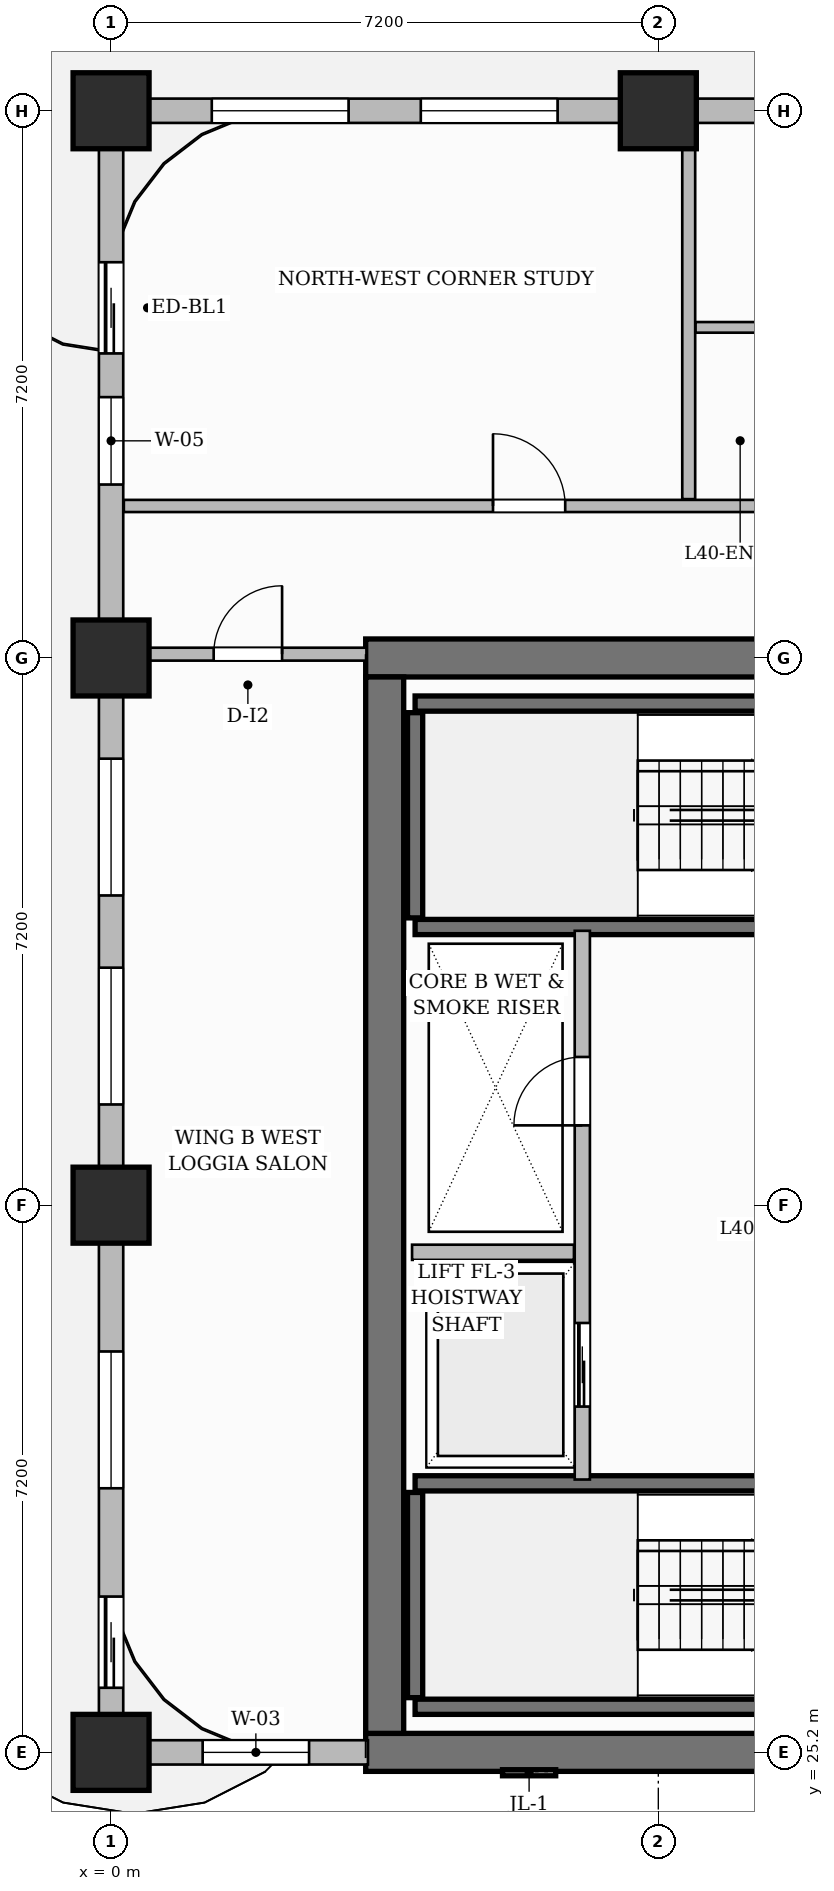
"""IFC4 building model, lengths in metres.
Left out: names, types, materials, properties, quantities, classifications, styles, units other than length and angle.
Written with IfcOpenShell. Run it as: python <this file> out.ifc"""

import sys

from ifc_helpers import new_model, si_unit, direction, frame, frame_2d, origin, origin_2d, place, context, subcontext, project, spatial, rectangle, extrude, source, transform, mapped, element, fill, save


model = new_model("IFC4")
c1 = context("Model", 3, precision=1e-05, world=origin(), true_north=direction((0.0, 1.0)))
c2 = subcontext(c1, "Body", "Model", "MODEL_VIEW")
j1 = project(units=[si_unit("LENGTHUNIT", "METRE"), si_unit("PLANEANGLEUNIT", "RADIAN")], contexts=[c1])
p1 = place(None, origin())
s1 = spatial("IfcSite", under=j1, at=p1, CompositionType="ELEMENT")
p2 = place(p1, origin())
s2 = spatial("IfcBuilding", under=s1, at=p2, CompositionType="ELEMENT")
p3 = place(p2, frame((0.0, 0.0, 161.85)))
s3 = spatial("IfcBuildingStorey", under=s2, at=p3, CompositionType="ELEMENT", Elevation=161.85)
for number, where, z_axis, x_axis in (
    (1, (3.35, 25.2, 0.0), (0.0, 0.0, 1.0), (1.0, 0.0, 0.0)),
    (2, (3.35, 39.6, 0.0), (0.0, 0.0, 1.0), (1.0, 0.0, 0.0)),
):
    element("IfcWall", number, at=place(p3, frame(where, z_axis=z_axis, x_axis=x_axis)), inside=s3, PredefinedType="SHEAR", context=c2, shape_type="SweptSolid", body=[
        extrude(rectangle(XDim=8.3, YDim=0.5, at=frame_2d((4.15, 0.0))), origin(), (0.0, 0.0, 1.0), 3.85),
    ])
p4 = place(p3, frame((3.6, 25.45, 0.0), z_axis=(0.0, 0.0, 1.0), x_axis=(0.0, 1.0, 0.0)))
e3 = element("IfcWall", 3, at=p4, inside=s3, PredefinedType="SHEAR", context=c2, shape_type="SweptSolid", body=[
    extrude(rectangle(XDim=13.9, YDim=0.5, at=frame_2d((6.95, 0.0))), origin(), (0.0, 0.0, 1.0), 3.85),
])
m1 = source(origin(), c2, "Body", "SweptSolid", [
    extrude(rectangle(XDim=1.0, YDim=1.0, at=origin_2d()), origin(), (0.0, 0.0, 1.0), 3.85),
])
for number, where, z_axis, x_axis in (
    (4, (0.0, 25.2, 0.0), (0.0, 0.0, 1.0), (1.0, 0.0, 0.0)),
    (5, (0.0, 32.4, 0.0), (0.0, 0.0, 1.0), (1.0, 0.0, 0.0)),
    (6, (0.0, 39.6, 0.0), (0.0, 0.0, 1.0), (1.0, 0.0, 0.0)),
    (7, (0.0, 46.8, 0.0), (0.0, 0.0, 1.0), (1.0, 0.0, 0.0)),
    (8, (7.2, 46.8, 0.0), (0.0, 0.0, 1.0), (1.0, 0.0, 0.0)),
):
    element("IfcColumn", number, at=place(p3, frame(where, z_axis=z_axis, x_axis=x_axis)), inside=s3, PredefinedType="COLUMN", context=c2, shape_type="MappedRepresentation", body=[
        mapped(m1, transform((0.0, 0.0, 0.0), scale=1.0)),
    ])
p5 = place(p3, frame((4.0, 25.8, 0.0), z_axis=(0.0, 0.0, 1.0), x_axis=(1.0, 0.0, 0.0)))
e9 = element("IfcWall", 9, at=p5, inside=s3, PredefinedType="SHEAR", context=c2, shape_type="SweptSolid", body=[
    extrude(rectangle(XDim=7.1, YDim=0.2, at=frame_2d((3.55, 0.0))), origin(), (0.0, 0.0, 1.0), 3.85),
])
p6 = place(p3, frame((4.0, 25.92, 0.0), z_axis=(0.0, 0.0, 1.0), x_axis=(0.0, 1.0, 0.0)))
e10 = element("IfcWall", 10, at=p6, inside=s3, PredefinedType="SHEAR", context=c2, shape_type="SweptSolid", body=[
    extrude(rectangle(XDim=2.7, YDim=0.2, at=frame_2d((1.35, 0.0))), origin(), (0.0, 0.0, 1.0), 3.85),
])
p7 = place(p3, frame((4.0, 28.74, 0.0), z_axis=(0.0, 0.0, 1.0), x_axis=(1.0, 0.0, 0.0)))
e11 = element("IfcWall", 11, at=p7, inside=s3, PredefinedType="SHEAR", context=c2, shape_type="SweptSolid", body=[
    extrude(rectangle(XDim=7.1, YDim=0.2, at=frame_2d((3.55, 0.0))), origin(), (0.0, 0.0, 1.0), 3.85),
])
p8 = place(p7, frame((5.815, 0.0, 0.0)))
e12 = element("IfcOpeningElement", 12, at=p8, cuts=e11, PredefinedType="OPENING", context=c2, shape_type="SweptSolid", body=[
    extrude(rectangle(XDim=1.05, YDim=2.2, at=frame_2d((0.525, 1.1))), frame((0.0, 0.11, 0.0), z_axis=(0.0, -1.0, 0.0), x_axis=(1.0, 0.0, 0.0)), (0.0, 0.0, 1.0), 0.22),
])
p9 = place(p3, frame((4.0, 39.0, 0.0), z_axis=(0.0, 0.0, 1.0), x_axis=(1.0, 0.0, 0.0)))
e13 = element("IfcWall", 13, at=p9, inside=s3, PredefinedType="SHEAR", context=c2, shape_type="SweptSolid", body=[
    extrude(rectangle(XDim=7.1, YDim=0.2, at=frame_2d((3.55, 0.0))), origin(), (0.0, 0.0, 1.0), 3.85),
])
p10 = place(p3, frame((4.0, 36.18, 0.0), z_axis=(0.0, 0.0, 1.0), x_axis=(0.0, 1.0, 0.0)))
e14 = element("IfcWall", 14, at=p10, inside=s3, PredefinedType="SHEAR", context=c2, shape_type="SweptSolid", body=[
    extrude(rectangle(XDim=2.7, YDim=0.2, at=frame_2d((1.35, 0.0))), origin(), (0.0, 0.0, 1.0), 3.85),
])
p11 = place(p3, frame((4.0, 36.06, 0.0), z_axis=(0.0, 0.0, 1.0), x_axis=(1.0, 0.0, 0.0)))
e15 = element("IfcWall", 15, at=p11, inside=s3, PredefinedType="SHEAR", context=c2, shape_type="SweptSolid", body=[
    extrude(rectangle(XDim=7.1, YDim=0.2, at=frame_2d((3.55, 0.0))), origin(), (0.0, 0.0, 1.0), 3.85),
])
p12 = place(p11, frame((5.815, 0.0, 0.0)))
e16 = element("IfcOpeningElement", 16, at=p12, cuts=e15, PredefinedType="OPENING", context=c2, shape_type="SweptSolid", body=[
    extrude(rectangle(XDim=1.05, YDim=2.2, at=frame_2d((0.525, 1.1))), frame((0.0, 0.11, 0.0), z_axis=(0.0, -1.0, 0.0), x_axis=(1.0, 0.0, 0.0)), (0.0, 0.0, 1.0), 0.22),
])
p13 = place(p3, frame((6.2, 28.79, 0.0), z_axis=(0.0, 0.0, 1.0), x_axis=(0.0, 1.0, 0.0)))
e17 = element("IfcWall", 17, at=p13, inside=s3, PredefinedType="PARTITIONING", context=c2, shape_type="SweptSolid", body=[
    extrude(rectangle(XDim=7.22, YDim=0.2, at=frame_2d((3.61, 0.0))), origin(), (0.0, 0.0, 1.0), 3.6),
])
p14 = place(p13, frame((4.66, 0.0, 0.0)))
e18 = element("IfcOpeningElement", 18, at=p14, cuts=e17, PredefinedType="OPENING", context=c2, shape_type="SweptSolid", body=[
    extrude(rectangle(XDim=0.9, YDim=2.1, at=frame_2d((0.45, 1.05))), frame((0.0, 0.11, 0.0), z_axis=(0.0, -1.0, 0.0), x_axis=(1.0, 0.0, 0.0)), (0.0, 0.0, 1.0), 0.22),
])
p15 = place(p13, frame((0.96, 0.0, 0.0)))
e19 = element("IfcOpeningElement", 19, at=p15, cuts=e17, PredefinedType="OPENING", context=c2, shape_type="SweptSolid", body=[
    extrude(rectangle(XDim=1.1, YDim=2.2, at=frame_2d((0.55, 1.1))), frame((0.0, 0.11, 0.0), z_axis=(0.0, -1.0, 0.0), x_axis=(1.0, 0.0, 0.0)), (0.0, 0.0, 1.0), 0.22),
])
p16 = place(p3, frame((3.96, 31.78, 0.0), z_axis=(0.0, 0.0, 1.0), x_axis=(1.0, 0.0, 0.0)))
e20 = element("IfcWall", 20, at=p16, inside=s3, PredefinedType="PARTITIONING", context=c2, shape_type="SweptSolid", body=[
    extrude(rectangle(XDim=2.13, YDim=0.2, at=frame_2d((1.065, 0.0))), origin(), (0.0, 0.0, 1.0), 3.6),
])
p17 = place(p3, frame((0.24, 39.65, 0.0), z_axis=(0.0, 0.0, 1.0), x_axis=(1.0, 0.0, 0.0)))
e21 = element("IfcWall", 21, at=p17, inside=s3, PredefinedType="PARTITIONING", context=c2, shape_type="SweptSolid", body=[
    extrude(rectangle(XDim=3.12, YDim=0.17, at=frame_2d((1.56, 0.0))), origin(), (0.0, 0.0, 1.0), 3.6),
])
p18 = place(p17, frame((1.11, 0.0, 0.0)))
e22 = element("IfcOpeningElement", 22, at=p18, cuts=e21, PredefinedType="OPENING", context=c2, shape_type="SweptSolid", body=[
    extrude(rectangle(XDim=0.9, YDim=2.15, at=frame_2d((0.45, 1.075))), frame((0.0, 0.095, 0.0), z_axis=(0.0, -1.0, 0.0), x_axis=(1.0, 0.0, 0.0)), (0.0, 0.0, 1.0), 0.19),
])
p19 = place(p3, frame((7.6, 41.69, 0.0), z_axis=(0.0, 0.0, 1.0), x_axis=(0.0, 1.0, 0.0)))
e23 = element("IfcWall", 23, at=p19, inside=s3, PredefinedType="PARTITIONING", context=c2, shape_type="SweptSolid", body=[
    extrude(rectangle(XDim=4.87, YDim=0.17, at=frame_2d((2.435, 0.0))), origin(), (0.0, 0.0, 1.0), 3.6),
])
p20 = place(p3, frame((0.168, 41.6, 0.0), z_axis=(0.0, 0.0, 1.0), x_axis=(1.0, 0.0, 0.0)))
e24 = element("IfcWall", 24, at=p20, inside=s3, PredefinedType="PARTITIONING", context=c2, shape_type="SweptSolid", body=[
    extrude(rectangle(XDim=14.792, YDim=0.16, at=frame_2d((7.396, 0.0))), origin(), (0.0, 0.0, 1.0), 3.085),
])
p21 = place(p20, frame((4.857, 0.0, 0.0)))
e25 = element("IfcOpeningElement", 25, at=p21, cuts=e24, PredefinedType="OPENING", context=c2, shape_type="SweptSolid", body=[
    extrude(rectangle(XDim=0.95, YDim=2.15, at=frame_2d((0.475, 1.075))), frame((0.0, 0.09, 0.0), z_axis=(0.0, -1.0, 0.0), x_axis=(1.0, 0.0, 0.0)), (0.0, 0.0, 1.0), 0.18),
])
p22 = place(p3, frame((7.69, 43.95, 0.0), z_axis=(0.0, 0.0, 1.0), x_axis=(1.0, 0.0, 0.0)))
e26 = element("IfcWall", 26, at=p22, inside=s3, PredefinedType="PARTITIONING", context=c2, shape_type="SweptSolid", body=[
    extrude(rectangle(XDim=2.07, YDim=0.14, at=frame_2d((1.035, 0.0))), origin(), (0.0, 0.0, 1.0), 3.085),
])
p23 = place(p3, frame((0.0, 25.2, 0.0), z_axis=(0.0, 0.0, 1.0), x_axis=(1.0, 0.0, 0.0)))
e27 = element("IfcWall", 27, at=p23, inside=s3, PredefinedType="SOLIDWALL", context=c2, shape_type="SweptSolid", body=[
    extrude(rectangle(XDim=3.38, YDim=0.32, at=frame_2d((1.69, 0.0))), origin(), (0.0, 0.0, 1.0), 3.6),
])
p24 = place(p23, frame((1.205, 0.0, 0.8)))
e28 = element("IfcOpeningElement", 28, at=p24, cuts=e27, PredefinedType="OPENING", context=c2, shape_type="SweptSolid", body=[
    extrude(rectangle(XDim=1.4, YDim=1.85, at=frame_2d((0.7, 0.925))), frame((0.0, 0.17, 0.0), z_axis=(0.0, -1.0, 0.0), x_axis=(1.0, 0.0, 0.0)), (0.0, 0.0, 1.0), 0.34),
])
p25 = place(p3, frame((0.0, 25.25, 0.0), z_axis=(0.0, 0.0, 1.0), x_axis=(0.0, 1.0, 0.0)))
e29 = element("IfcWall", 29, at=p25, inside=s3, PredefinedType="SOLIDWALL", context=c2, shape_type="SweptSolid", body=[
    extrude(rectangle(XDim=21.5, YDim=0.32, at=frame_2d((10.75, 0.0))), origin(), (0.0, 0.0, 1.0), 3.085),
])
p26 = place(p25, frame((18.357, 0.0, 0.0)))
e30 = element("IfcOpeningElement", 30, at=p26, cuts=e29, PredefinedType="OPENING", context=c2, shape_type="SweptSolid", body=[
    extrude(rectangle(XDim=1.2, YDim=2.2, at=frame_2d((0.6, 1.1))), frame((0.0, 0.17, 0.0), z_axis=(0.0, -1.0, 0.0), x_axis=(1.0, 0.0, 0.0)), (0.0, 0.0, 1.0), 0.34),
])
p27 = place(p25, frame((0.8, 0.0, 0.0)))
e31 = element("IfcOpeningElement", 31, at=p27, cuts=e29, PredefinedType="OPENING", context=c2, shape_type="SweptSolid", body=[
    extrude(rectangle(XDim=1.2, YDim=2.2, at=frame_2d((0.6, 1.1))), frame((0.0, 0.17, 0.0), z_axis=(0.0, -1.0, 0.0), x_axis=(1.0, 0.0, 0.0)), (0.0, 0.0, 1.0), 0.34),
])
p28 = place(p25, frame((3.425, 0.0, 0.8)))
e32 = element("IfcOpeningElement", 32, at=p28, cuts=e29, PredefinedType="OPENING", context=c2, shape_type="SweptSolid", body=[
    extrude(rectangle(XDim=1.8, YDim=1.85, at=frame_2d((0.9, 0.925))), frame((0.0, 0.17, 0.0), z_axis=(0.0, -1.0, 0.0), x_axis=(1.0, 0.0, 0.0)), (0.0, 0.0, 1.0), 0.34),
])
p29 = place(p25, frame((8.475, 0.0, 0.8)))
e33 = element("IfcOpeningElement", 33, at=p29, cuts=e29, PredefinedType="OPENING", context=c2, shape_type="SweptSolid", body=[
    extrude(rectangle(XDim=1.8, YDim=1.85, at=frame_2d((0.9, 0.925))), frame((0.0, 0.17, 0.0), z_axis=(0.0, -1.0, 0.0), x_axis=(1.0, 0.0, 0.0)), (0.0, 0.0, 1.0), 0.34),
])
p30 = place(p25, frame((11.225, 0.0, 0.8)))
e34 = element("IfcOpeningElement", 34, at=p30, cuts=e29, PredefinedType="OPENING", context=c2, shape_type="SweptSolid", body=[
    extrude(rectangle(XDim=1.8, YDim=1.85, at=frame_2d((0.9, 0.925))), frame((0.0, 0.17, 0.0), z_axis=(0.0, -1.0, 0.0), x_axis=(1.0, 0.0, 0.0)), (0.0, 0.0, 1.0), 0.34),
])
p31 = place(p25, frame((16.632, 0.0, 0.8)))
e35 = element("IfcOpeningElement", 35, at=p31, cuts=e29, PredefinedType="OPENING", context=c2, shape_type="SweptSolid", body=[
    extrude(rectangle(XDim=1.15, YDim=1.8, at=frame_2d((0.575, 0.9))), frame((0.0, 0.17, 0.0), z_axis=(0.0, -1.0, 0.0), x_axis=(1.0, 0.0, 0.0)), (0.0, 0.0, 1.0), 0.34),
])
p32 = place(p3, frame((0.0, 46.8, 0.0), z_axis=(0.0, 0.0, 1.0), x_axis=(1.0, 0.0, 0.0)))
e36 = element("IfcWall", 36, at=p32, inside=s3, PredefinedType="SOLIDWALL", context=c2, shape_type="SweptSolid", body=[
    extrude(rectangle(XDim=18.0, YDim=0.32, at=frame_2d((9.0, 0.0))), origin(), (0.0, 0.0, 1.0), 3.085),
])
p33 = place(p32, frame((1.325, 0.0, 0.8)))
e37 = element("IfcOpeningElement", 37, at=p33, cuts=e36, PredefinedType="OPENING", context=c2, shape_type="SweptSolid", body=[
    extrude(rectangle(XDim=1.8, YDim=1.85, at=frame_2d((0.9, 0.925))), frame((0.0, 0.17, 0.0), z_axis=(0.0, -1.0, 0.0), x_axis=(1.0, 0.0, 0.0)), (0.0, 0.0, 1.0), 0.34),
])
p34 = place(p32, frame((4.075, 0.0, 0.8)))
e38 = element("IfcOpeningElement", 38, at=p34, cuts=e36, PredefinedType="OPENING", context=c2, shape_type="SweptSolid", body=[
    extrude(rectangle(XDim=1.8, YDim=1.85, at=frame_2d((0.9, 0.925))), frame((0.0, 0.17, 0.0), z_axis=(0.0, -1.0, 0.0), x_axis=(1.0, 0.0, 0.0)), (0.0, 0.0, 1.0), 0.34),
])
p35 = place(p32, frame((8.525, 0.0, 0.8)))
e39 = element("IfcOpeningElement", 39, at=p35, cuts=e36, PredefinedType="OPENING", context=c2, shape_type="SweptSolid", body=[
    extrude(rectangle(XDim=1.8, YDim=1.85, at=frame_2d((0.9, 0.925))), frame((0.0, 0.17, 0.0), z_axis=(0.0, -1.0, 0.0), x_axis=(1.0, 0.0, 0.0)), (0.0, 0.0, 1.0), 0.34),
])
p36 = place(p32, frame((11.275, 0.0, 0.8)))
e40 = element("IfcOpeningElement", 40, at=p36, cuts=e36, PredefinedType="OPENING", context=c2, shape_type="SweptSolid", body=[
    extrude(rectangle(XDim=1.8, YDim=1.85, at=frame_2d((0.9, 0.925))), frame((0.0, 0.17, 0.0), z_axis=(0.0, -1.0, 0.0), x_axis=(1.0, 0.0, 0.0)), (0.0, 0.0, 1.0), 0.34),
])
p37 = place(p32, frame((15.5, 0.0, 0.8)))
e41 = element("IfcOpeningElement", 41, at=p37, cuts=e36, PredefinedType="OPENING", context=c2, shape_type="SweptSolid", body=[
    extrude(rectangle(XDim=1.4, YDim=1.85, at=frame_2d((0.7, 0.925))), frame((0.0, 0.17, 0.0), z_axis=(0.0, -1.0, 0.0), x_axis=(1.0, 0.0, 0.0)), (0.0, 0.0, 1.0), 0.34),
])
m2 = source(origin(), c2, "Body", "SweptSolid", [
    extrude(rectangle(XDim=0.9, YDim=2.1, at=frame_2d((0.45, 1.05))), frame((0.0, 0.025, 0.0), z_axis=(0.0, -1.0, 0.0), x_axis=(1.0, 0.0, 0.0)), (0.0, 0.0, 1.0), 0.05),
])
p38 = place(p14, origin())
e42 = element("IfcDoor", 42, at=p38, inside=s3, OperationType="SINGLE_SWING_LEFT", PredefinedType="DOOR", context=c2, shape_type="MappedRepresentation", body=[
    mapped(m2, transform((0.0, 0.0, 0.0), scale=1.0)),
])
fill(e18, e42)
m3 = source(origin(), c2, "Body", "SweptSolid", [
    extrude(rectangle(XDim=0.9, YDim=2.15, at=frame_2d((0.45, 1.075))), frame((0.0, 0.025, 0.0), z_axis=(0.0, -1.0, 0.0), x_axis=(1.0, 0.0, 0.0)), (0.0, 0.0, 1.0), 0.05),
])
p39 = place(p18, origin())
e43 = element("IfcDoor", 43, at=p39, inside=s3, OperationType="SINGLE_SWING_RIGHT", PredefinedType="DOOR", context=c2, shape_type="MappedRepresentation", body=[
    mapped(m3, transform((0.0, 0.0, 0.0), scale=1.0)),
])
fill(e22, e43)
m4 = source(origin(), c2, "Body", "SweptSolid", [
    extrude(rectangle(XDim=0.95, YDim=2.15, at=frame_2d((0.475, 1.075))), frame((0.0, 0.025, 0.0), z_axis=(0.0, -1.0, 0.0), x_axis=(1.0, 0.0, 0.0)), (0.0, 0.0, 1.0), 0.05),
])
p40 = place(p21, origin())
e44 = element("IfcDoor", 44, at=p40, inside=s3, OperationType="SINGLE_SWING_LEFT", PredefinedType="DOOR", context=c2, shape_type="MappedRepresentation", body=[
    mapped(m4, transform((0.0, 0.0, 0.0), scale=1.0)),
])
fill(e25, e44)
m5 = source(origin(), c2, "Body", "SweptSolid", [
    extrude(rectangle(XDim=1.1, YDim=2.2, at=frame_2d((0.55, 1.1))), frame((0.0, 0.025, 0.0), z_axis=(0.0, -1.0, 0.0), x_axis=(1.0, 0.0, 0.0)), (0.0, 0.0, 1.0), 0.05),
])
p41 = place(p15, origin())
e45 = element("IfcDoor", 45, at=p41, inside=s3, OperationType="SLIDING_TO_LEFT", PredefinedType="DOOR", context=c2, shape_type="MappedRepresentation", body=[
    mapped(m5, transform((0.0, 0.0, 0.0), scale=1.0)),
])
fill(e19, e45)
m6 = source(origin(), c2, "Body", "SweptSolid", [
    extrude(rectangle(XDim=1.2, YDim=2.2, at=frame_2d((0.6, 1.1))), frame((0.0, 0.025, 0.0), z_axis=(0.0, -1.0, 0.0), x_axis=(1.0, 0.0, 0.0)), (0.0, 0.0, 1.0), 0.05),
])
p42 = place(p26, origin())
e46 = element("IfcDoor", 46, at=p42, inside=s3, OperationType="SLIDING_TO_LEFT", PredefinedType="DOOR", context=c2, shape_type="MappedRepresentation", body=[
    mapped(m6, transform((0.0, 0.0, 0.0), scale=1.0)),
])
fill(e30, e46)
p43 = place(p27, origin())
e47 = element("IfcDoor", 47, at=p43, inside=s3, OperationType="SLIDING_TO_LEFT", PredefinedType="DOOR", context=c2, shape_type="MappedRepresentation", body=[
    mapped(m6, transform((0.0, 0.0, 0.0), scale=1.0)),
])
fill(e31, e47)
m7 = source(origin(), c2, "Body", "SweptSolid", [
    extrude(rectangle(XDim=1.4, YDim=1.85, at=frame_2d((0.7, 0.925))), frame((0.0, 0.03, 0.0), z_axis=(0.0, -1.0, 0.0), x_axis=(1.0, 0.0, 0.0)), (0.0, 0.0, 1.0), 0.06),
])
p44 = place(p24, origin())
e48 = element("IfcWindow", 48, at=p44, inside=s3, PartitioningType="SINGLE_PANEL", PredefinedType="WINDOW", context=c2, shape_type="MappedRepresentation", body=[
    mapped(m7, transform((0.0, 0.0, 0.0), scale=1.0)),
])
fill(e28, e48)
m8 = source(origin(), c2, "Body", "SweptSolid", [
    extrude(rectangle(XDim=1.8, YDim=1.85, at=frame_2d((0.9, 0.925))), frame((0.0, 0.03, 0.0), z_axis=(0.0, -1.0, 0.0), x_axis=(1.0, 0.0, 0.0)), (0.0, 0.0, 1.0), 0.06),
])
p45 = place(p28, origin())
e49 = element("IfcWindow", 49, at=p45, inside=s3, PartitioningType="DOUBLE_PANEL_VERTICAL", PredefinedType="WINDOW", context=c2, shape_type="MappedRepresentation", body=[
    mapped(m8, transform((0.0, 0.0, 0.0), scale=1.0)),
])
fill(e32, e49)
p46 = place(p29, origin())
e50 = element("IfcWindow", 50, at=p46, inside=s3, PartitioningType="DOUBLE_PANEL_VERTICAL", PredefinedType="WINDOW", context=c2, shape_type="MappedRepresentation", body=[
    mapped(m8, transform((0.0, 0.0, 0.0), scale=1.0)),
])
fill(e33, e50)
p47 = place(p30, origin())
e51 = element("IfcWindow", 51, at=p47, inside=s3, PartitioningType="DOUBLE_PANEL_VERTICAL", PredefinedType="WINDOW", context=c2, shape_type="MappedRepresentation", body=[
    mapped(m8, transform((0.0, 0.0, 0.0), scale=1.0)),
])
fill(e34, e51)
m9 = source(origin(), c2, "Body", "SweptSolid", [
    extrude(rectangle(XDim=1.15, YDim=1.8, at=frame_2d((0.575, 0.9))), frame((0.0, 0.03, 0.0), z_axis=(0.0, -1.0, 0.0), x_axis=(1.0, 0.0, 0.0)), (0.0, 0.0, 1.0), 0.06),
])
p48 = place(p31, origin())
e52 = element("IfcWindow", 52, at=p48, inside=s3, PartitioningType="SINGLE_PANEL", PredefinedType="WINDOW", context=c2, shape_type="MappedRepresentation", body=[
    mapped(m9, transform((0.0, 0.0, 0.0), scale=1.0)),
])
fill(e35, e52)
p49 = place(p33, origin())
e53 = element("IfcWindow", 53, at=p49, inside=s3, PartitioningType="DOUBLE_PANEL_VERTICAL", PredefinedType="WINDOW", context=c2, shape_type="MappedRepresentation", body=[
    mapped(m8, transform((0.0, 0.0, 0.0), scale=1.0)),
])
fill(e37, e53)
p50 = place(p34, origin())
e54 = element("IfcWindow", 54, at=p50, inside=s3, PartitioningType="DOUBLE_PANEL_VERTICAL", PredefinedType="WINDOW", context=c2, shape_type="MappedRepresentation", body=[
    mapped(m8, transform((0.0, 0.0, 0.0), scale=1.0)),
])
fill(e38, e54)
save(model, sys.argv[1])
